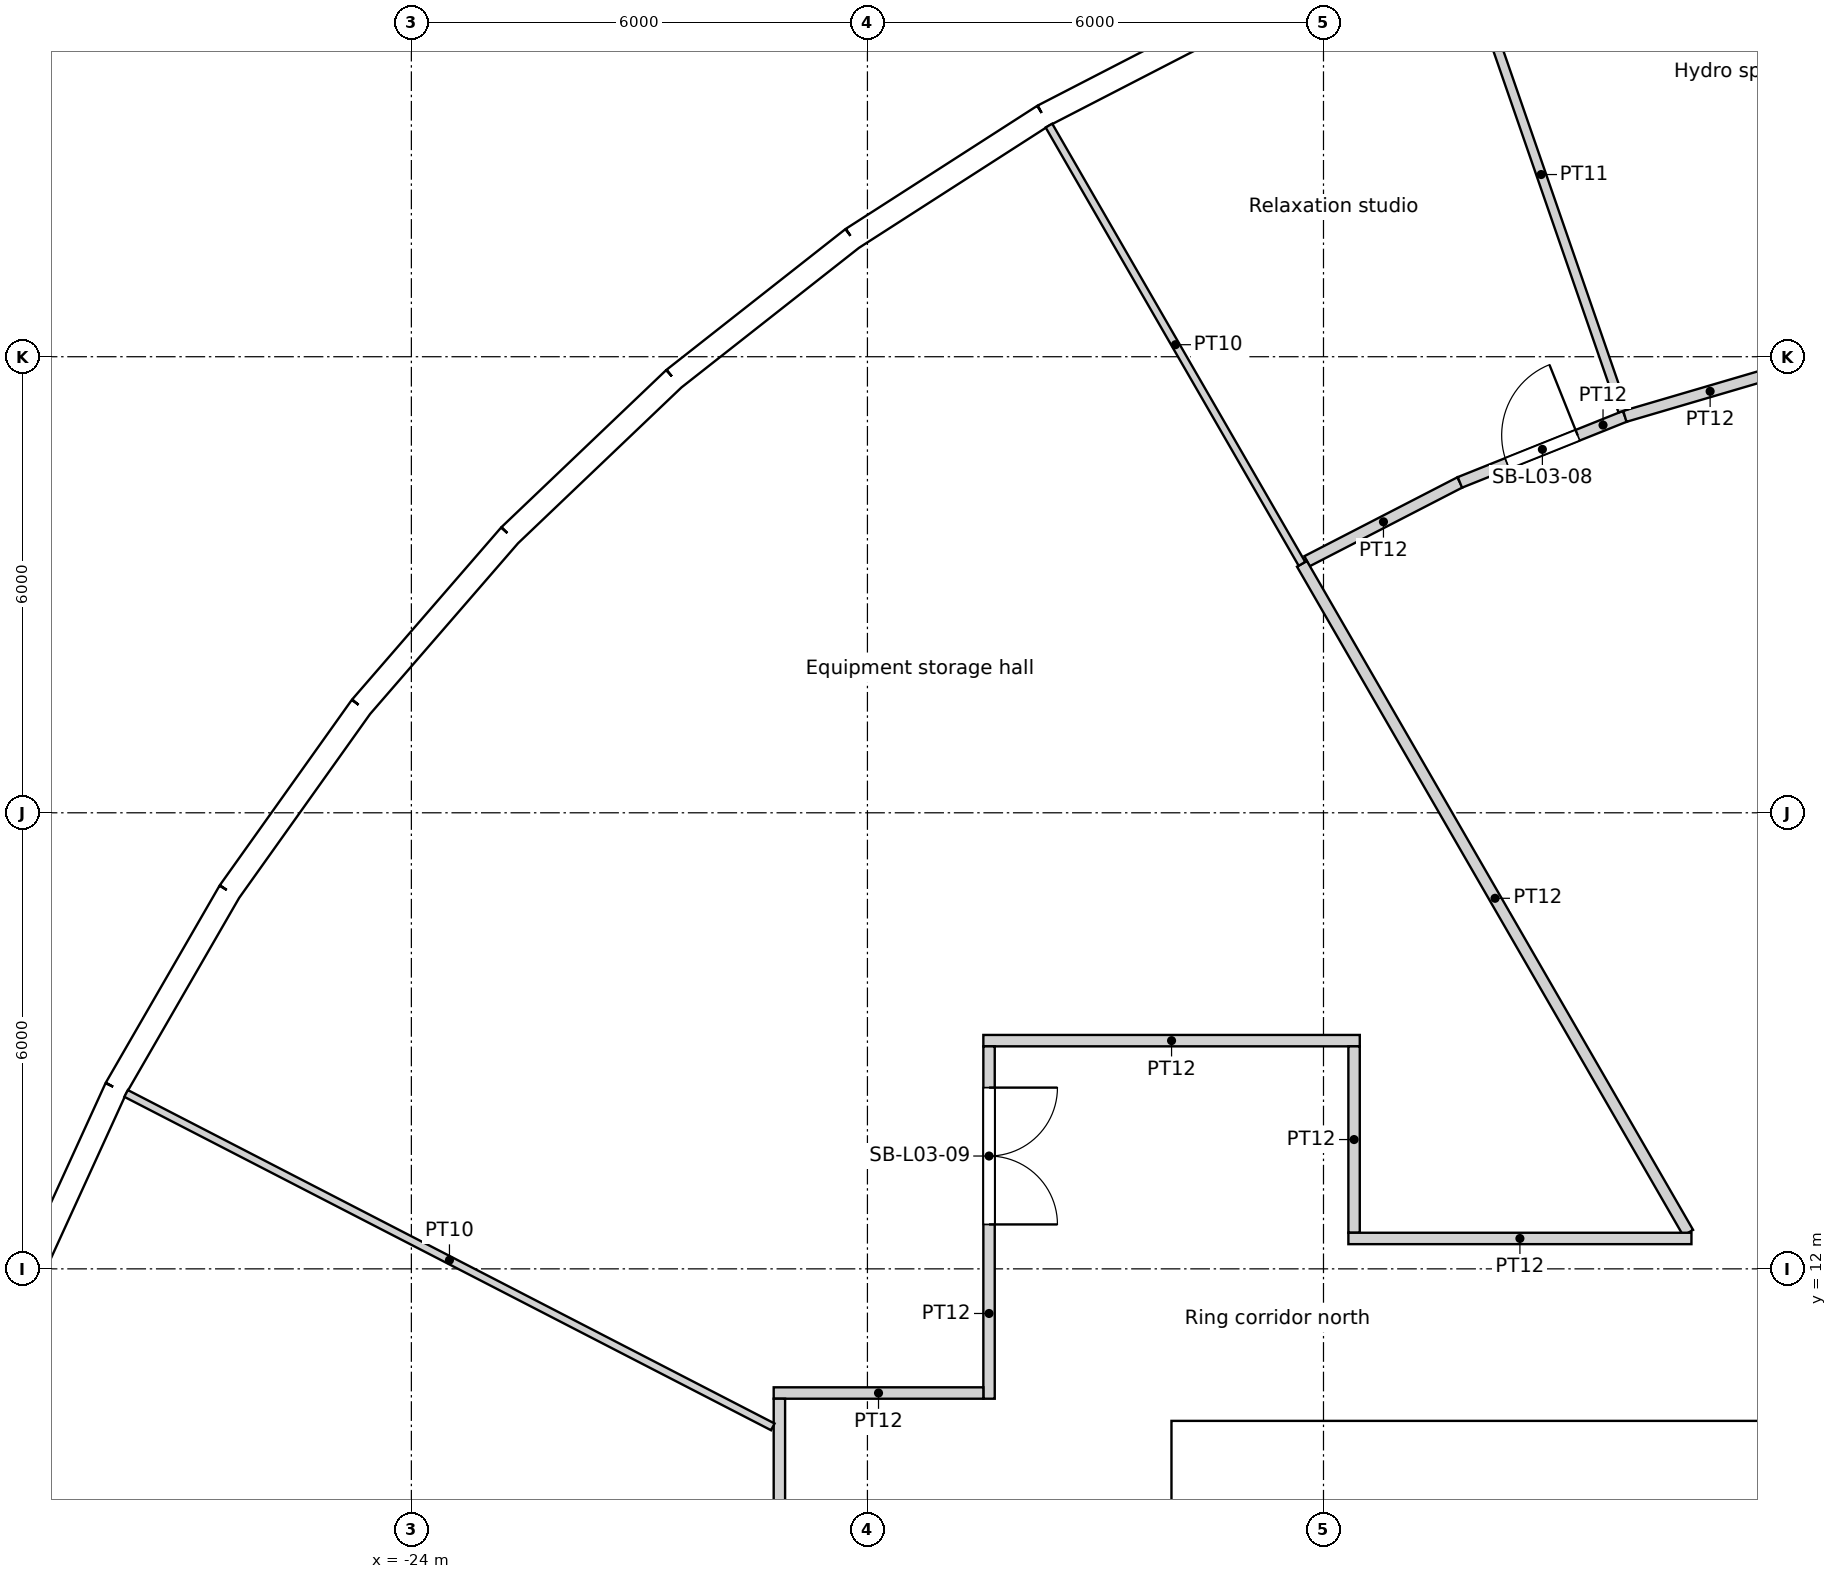
"""IFC4 building model, lengths in metres.
Left out: names, types, materials, properties, quantities, classifications, styles, units other than length and angle.
Written with IfcOpenShell. Run it as: python <this file> out.ifc"""

import sys

from ifc_helpers import new_model, si_unit, direction, frame, frame_2d, origin, origin_2d, place, context, subcontext, project, spatial, rectangle, circle, extrude, element, fill, save


model = new_model("IFC4")
c1 = context("Model", 3, precision=1e-05, world=origin(), true_north=direction((0.0, 1.0)))
c2 = subcontext(c1, "Body", "Model", "MODEL_VIEW")
j1 = project(units=[si_unit("LENGTHUNIT", "METRE"), si_unit("PLANEANGLEUNIT", "RADIAN")], contexts=[c1])
p1 = place(None, origin())
s1 = spatial("IfcSite", under=j1, at=p1, CompositionType="ELEMENT")
p2 = place(p1, origin())
s2 = spatial("IfcBuilding", under=s1, at=p2, CompositionType="ELEMENT")
p3 = place(p2, frame((0.0, 0.0, 18.6)))
s3 = spatial("IfcBuildingStorey", under=s2, at=p3, CompositionType="ELEMENT", Elevation=18.6)
for number, where, z_axis, x_axis in (
    (1, (-9.902, 28.61, 0.0), (0.0, 0.0, 1.0), (1.0, 0.0, 0.0)),
    (2, (-15.137, 26.219, 0.0), (0.0, 0.0, 1.0), (1.0, 0.0, 0.0)),
    (3, (-19.826, 22.88, 0.0), (0.0, 0.0, 1.0), (1.0, 0.0, 0.0)),
    (4, (-23.797, 18.715, 0.0), (0.0, 0.0, 1.0), (1.0, 0.0, 0.0)),
    (5, (-26.909, 13.873, 0.0), (0.0, 0.0, 1.0), (1.0, 0.0, 0.0)),
    (6, (-29.048, 8.529, 0.0), (0.0, 0.0, 1.0), (1.0, 0.0, 0.0)),
):
    element("IfcColumn", number, at=place(p3, frame(where, z_axis=z_axis, x_axis=x_axis)), inside=s3, PredefinedType="COLUMN", context=c2, shape_type="SweptSolid", body=[
        extrude(circle(Radius=0.7, at=origin_2d()), origin(), (0.0, 0.0, 1.0), 4.8),
    ])
for number, where, z_axis, x_axis in (
    (7, (-7.04, 23.516, 0.0), (0.0, 0.0, 1.0), (1.0, 0.0, 0.0)),
    (8, (-12.274, 21.259, 0.0), (0.0, 0.0, 1.0), (1.0, 0.0, 0.0)),
    (9, (-16.846, 17.855, 0.0), (0.0, 0.0, 1.0), (1.0, 0.0, 0.0)),
    (10, (-20.509, 13.489, 0.0), (0.0, 0.0, 1.0), (1.0, 0.0, 0.0)),
    (11, (-23.067, 8.396, 0.0), (0.0, 0.0, 1.0), (1.0, 0.0, 0.0)),
):
    element("IfcColumn", number, at=place(p3, frame(where, z_axis=z_axis, x_axis=x_axis)), inside=s3, PredefinedType="COLUMN", context=c2, shape_type="SweptSolid", body=[
        extrude(circle(Radius=0.75, at=origin_2d()), origin(), (0.0, 0.0, 1.0), 4.8),
    ])
for number, where, z_axis, x_axis in (
    (12, (-9.411, 16.301, 0.0), (0.0, 0.0, 1.0), (1.0, 0.0, 0.0)),
    (13, (-13.798, 12.802, 0.0), (0.0, 0.0, 1.0), (1.0, 0.0, 0.0)),
):
    element("IfcColumn", number, at=place(p3, frame(where, z_axis=z_axis, x_axis=x_axis)), inside=s3, PredefinedType="COLUMN", context=c2, shape_type="SweptSolid", body=[
        extrude(circle(Radius=0.8, at=origin_2d()), origin(), (0.0, 0.0, 1.0), 4.8),
    ])
p4 = place(p3, frame((-13.033, 28.539, 0.0), z_axis=(0.0, 0.0, 1.0), x_axis=(-0.888831268481, -0.458234630043, 0.0)))
e14 = element("IfcWall", 14, at=p4, inside=s3, PredefinedType="SOLIDWALL", context=c2, shape_type="SweptSolid", body=[
    extrude(rectangle(XDim=2.986, YDim=0.3, at=frame_2d((1.493, 0.0))), origin(), (0.0, 0.0, 1.0), 4.35),
])
p5 = place(p4, frame((1.493, 0.0, 2.0)))
e15 = element("IfcOpeningElement", 15, at=p5, cuts=e14, PredefinedType="OPENING", context=c2, shape_type="SweptSolid", body=[
    extrude(circle(Radius=1.2, at=origin_2d()), frame((0.0, 0.16, 0.0), z_axis=(0.0, -1.0, 0.0), x_axis=(1.0, 0.0, 0.0)), (0.0, 0.0, 1.0), 0.32),
])
p6 = place(p3, frame((-15.687, 27.171, 0.0), z_axis=(0.0, 0.0, 1.0), x_axis=(-0.841242231846, -0.540658401727, 0.0)))
e16 = element("IfcWall", 16, at=p6, inside=s3, PredefinedType="SOLIDWALL", context=c2, shape_type="SweptSolid", body=[
    extrude(rectangle(XDim=2.986, YDim=0.3, at=frame_2d((1.493, 0.0))), origin(), (0.0, 0.0, 1.0), 4.35),
])
p7 = place(p6, frame((1.493, 0.0, 2.0)))
e17 = element("IfcOpeningElement", 17, at=p7, cuts=e16, PredefinedType="OPENING", context=c2, shape_type="SweptSolid", body=[
    extrude(circle(Radius=1.2, at=origin_2d()), frame((0.0, 0.16, 0.0), z_axis=(0.0, -1.0, 0.0), x_axis=(1.0, 0.0, 0.0)), (0.0, 0.0, 1.0), 0.32),
])
p8 = place(p3, frame((-18.199, 25.557, 0.0), z_axis=(0.0, 0.0, 1.0), x_axis=(-0.786043032847, -0.618171780747, 0.0)))
e18 = element("IfcWall", 18, at=p8, inside=s3, PredefinedType="SOLIDWALL", context=c2, shape_type="SweptSolid", body=[
    extrude(rectangle(XDim=2.986, YDim=0.3, at=frame_2d((1.493, 0.0))), origin(), (0.0, 0.0, 1.0), 4.35),
])
p9 = place(p8, frame((1.493, 0.0, 2.0)))
e19 = element("IfcOpeningElement", 19, at=p9, cuts=e18, PredefinedType="OPENING", context=c2, shape_type="SweptSolid", body=[
    extrude(circle(Radius=1.2, at=origin_2d()), frame((0.0, 0.16, 0.0), z_axis=(0.0, -1.0, 0.0), x_axis=(1.0, 0.0, 0.0)), (0.0, 0.0, 1.0), 0.32),
])
p10 = place(p3, frame((-20.546, 23.711, 0.0), z_axis=(0.0, 0.0, 1.0), x_axis=(-0.723750841228, -0.690061388444, 0.0)))
e20 = element("IfcWall", 20, at=p10, inside=s3, PredefinedType="SOLIDWALL", context=c2, shape_type="SweptSolid", body=[
    extrude(rectangle(XDim=2.986, YDim=0.3, at=frame_2d((1.493, 0.0))), origin(), (0.0, 0.0, 1.0), 4.35),
])
p11 = place(p10, frame((1.493, 0.0, 2.0)))
e21 = element("IfcOpeningElement", 21, at=p11, cuts=e20, PredefinedType="OPENING", context=c2, shape_type="SweptSolid", body=[
    extrude(circle(Radius=1.2, at=origin_2d()), frame((0.0, 0.16, 0.0), z_axis=(0.0, -1.0, 0.0), x_axis=(1.0, 0.0, 0.0)), (0.0, 0.0, 1.0), 0.32),
])
p12 = place(p3, frame((-22.707, 21.651, 0.0), z_axis=(0.0, 0.0, 1.0), x_axis=(-0.654809121128, -0.755794294029, 0.0)))
e22 = element("IfcWall", 22, at=p12, inside=s3, PredefinedType="SOLIDWALL", context=c2, shape_type="SweptSolid", body=[
    extrude(rectangle(XDim=2.986, YDim=0.3, at=frame_2d((1.493, 0.0))), origin(), (0.0, 0.0, 1.0), 4.35),
])
p13 = place(p12, frame((1.493, 0.0, 2.0)))
e23 = element("IfcOpeningElement", 23, at=p13, cuts=e22, PredefinedType="OPENING", context=c2, shape_type="SweptSolid", body=[
    extrude(circle(Radius=1.2, at=origin_2d()), frame((0.0, 0.16, 0.0), z_axis=(0.0, -1.0, 0.0), x_axis=(1.0, 0.0, 0.0)), (0.0, 0.0, 1.0), 0.32),
])
p14 = place(p3, frame((-24.662, 19.394, 0.0), z_axis=(0.0, 0.0, 1.0), x_axis=(-0.580100533892, -0.814544885551, 0.0)))
e24 = element("IfcWall", 24, at=p14, inside=s3, PredefinedType="SOLIDWALL", context=c2, shape_type="SweptSolid", body=[
    extrude(rectangle(XDim=2.986, YDim=0.3, at=frame_2d((1.493, 0.0))), origin(), (0.0, 0.0, 1.0), 4.35),
])
p15 = place(p14, frame((1.493, 0.0, 2.0)))
e25 = element("IfcOpeningElement", 25, at=p15, cuts=e24, PredefinedType="OPENING", context=c2, shape_type="SweptSolid", body=[
    extrude(circle(Radius=1.2, at=origin_2d()), frame((0.0, 0.16, 0.0), z_axis=(0.0, -1.0, 0.0), x_axis=(1.0, 0.0, 0.0)), (0.0, 0.0, 1.0), 0.32),
])
p16 = place(p3, frame((-26.394, 16.962, 0.0), z_axis=(0.0, 0.0, 1.0), x_axis=(-0.500017373705, -0.866015372839, 0.0)))
e26 = element("IfcWall", 26, at=p16, inside=s3, PredefinedType="SOLIDWALL", context=c2, shape_type="SweptSolid", body=[
    extrude(rectangle(XDim=2.986, YDim=0.3, at=frame_2d((1.493, 0.0))), origin(), (0.0, 0.0, 1.0), 4.35),
])
p17 = place(p16, frame((1.493, 0.0, 2.0)))
e27 = element("IfcOpeningElement", 27, at=p17, cuts=e26, PredefinedType="OPENING", context=c2, shape_type="SweptSolid", body=[
    extrude(circle(Radius=1.2, at=origin_2d()), frame((0.0, 0.16, 0.0), z_axis=(0.0, -1.0, 0.0), x_axis=(1.0, 0.0, 0.0)), (0.0, 0.0, 1.0), 0.32),
])
p18 = place(p3, frame((-27.887, 14.377, 0.0), z_axis=(0.0, 0.0, 1.0), x_axis=(-0.415373250944, -0.909651066289, 0.0)))
e28 = element("IfcWall", 28, at=p18, inside=s3, PredefinedType="SOLIDWALL", context=c2, shape_type="SweptSolid", body=[
    extrude(rectangle(XDim=2.986, YDim=0.3, at=frame_2d((1.493, 0.0))), origin(), (0.0, 0.0, 1.0), 4.35),
])
p19 = place(p18, frame((1.493, 0.0, 2.0)))
e29 = element("IfcOpeningElement", 29, at=p19, cuts=e28, PredefinedType="OPENING", context=c2, shape_type="SweptSolid", body=[
    extrude(circle(Radius=1.2, at=origin_2d()), frame((0.0, 0.16, 0.0), z_axis=(0.0, -1.0, 0.0), x_axis=(1.0, 0.0, 0.0)), (0.0, 0.0, 1.0), 0.32),
])
p20 = place(p3, frame((-14.0, 9.4, 0.0), z_axis=(0.0, 0.0, 1.0), x_axis=(1.0, 0.0, 0.0)))
e30 = element("IfcWall", 30, at=p20, inside=s3, PredefinedType="SOLIDWALL", context=c2, shape_type="SweptSolid", body=[
    extrude(rectangle(XDim=28.0, YDim=1.2, at=frame_2d((14.0, 0.0))), origin(), (0.0, 0.0, 1.0), 4.8),
])
p21 = place(p20, frame((9.8, 0.0, 0.0)))
e31 = element("IfcOpeningElement", 31, at=p21, cuts=e30, PredefinedType="OPENING", context=c2, shape_type="SweptSolid", body=[
    extrude(rectangle(XDim=1.8, YDim=2.1, at=frame_2d((0.9, 1.05))), frame((0.0, 0.6, 0.0), z_axis=(0.0, -1.0, 0.0), x_axis=(1.0, 0.0, 0.0)), (0.0, 0.0, 1.0), 1.2),
])
p22 = place(p3, frame((-27.753, 14.308, 0.0), z_axis=(0.0, 0.0, 1.0), x_axis=(0.888834817613, -0.458227745776, 0.0)))
e32 = element("IfcWall", 32, at=p22, inside=s3, PredefinedType="PARTITIONING", context=c2, shape_type="SweptSolid", body=[
    extrude(rectangle(XDim=9.573, YDim=0.1, at=frame_2d((4.786, 0.0))), origin(), (0.0, 0.0, 1.0), 3.75),
])
p23 = place(p3, frame((-19.158, 10.292, 0.0), z_axis=(0.0, 0.0, 1.0), x_axis=(0.0, -1.0, 0.0)))
e33 = element("IfcWall", 33, at=p23, inside=s3, PredefinedType="PARTITIONING", context=c2, shape_type="SweptSolid", body=[
    extrude(rectangle(XDim=4.4, YDim=0.15, at=frame_2d((2.2, 0.0))), origin(), (0.0, 0.0, 1.0), 3.75),
])
p24 = place(p3, frame((-16.475, 10.367, 0.0), z_axis=(0.0, 0.0, 1.0), x_axis=(-1.0, 0.0, 0.0)))
e34 = element("IfcWall", 34, at=p24, inside=s3, PredefinedType="PARTITIONING", context=c2, shape_type="SweptSolid", body=[
    extrude(rectangle(XDim=2.758, YDim=0.15, at=frame_2d((1.379, 0.0))), origin(), (0.0, 0.0, 1.0), 3.75),
])
p25 = place(p3, frame((-16.4, 10.292, 0.0), z_axis=(0.0, 0.0, 1.0), x_axis=(0.0, 1.0, 0.0)))
e35 = element("IfcWall", 35, at=p25, inside=s3, PredefinedType="PARTITIONING", context=c2, shape_type="SweptSolid", body=[
    extrude(rectangle(XDim=4.636, YDim=0.15, at=frame_2d((2.318, 0.0))), origin(), (0.0, 0.0, 1.0), 3.75),
])
p26 = place(p25, frame((2.293, 0.0, 0.0)))
e36 = element("IfcOpeningElement", 36, at=p26, cuts=e35, PredefinedType="OPENING", context=c2, shape_type="SweptSolid", body=[
    extrude(rectangle(XDim=1.8, YDim=2.4, at=frame_2d((0.9, 1.2))), frame((0.0, 0.075, 0.0), z_axis=(0.0, -1.0, 0.0), x_axis=(1.0, 0.0, 0.0)), (0.0, 0.0, 1.0), 0.15),
])
p27 = place(p3, frame((-15.612, 27.041, 0.0), z_axis=(0.0, 0.0, 1.0), x_axis=(0.499980638446, -0.866036581894, 0.0)))
e37 = element("IfcWall", 37, at=p27, inside=s3, PredefinedType="PARTITIONING", context=c2, shape_type="SweptSolid", body=[
    extrude(rectangle(XDim=6.657, YDim=0.1, at=frame_2d((3.329, 0.0))), origin(), (0.0, 0.0, 1.0), 3.75),
])
p28 = place(p3, frame((-12.283, 21.275, 0.0), z_axis=(0.0, 0.0, 1.0), x_axis=(0.500014995272, -0.866016746087, 0.0)))
e38 = element("IfcWall", 38, at=p28, inside=s3, PredefinedType="PARTITIONING", context=c2, shape_type="SweptSolid", body=[
    extrude(rectangle(XDim=10.162, YDim=0.15, at=frame_2d((5.081, 0.0))), origin(), (0.0, 0.0, 1.0), 3.75),
])
p29 = place(p3, frame((-11.598, 12.475, 0.0), z_axis=(0.0, 0.0, 1.0), x_axis=(0.0, 1.0, 0.0)))
e39 = element("IfcWall", 39, at=p29, inside=s3, PredefinedType="PARTITIONING", context=c2, shape_type="SweptSolid", body=[
    extrude(rectangle(XDim=2.452, YDim=0.15, at=frame_2d((1.226, 0.0))), origin(), (0.0, 0.0, 1.0), 3.75),
])
p30 = place(p3, frame((-11.523, 15.002, 0.0), z_axis=(0.0, 0.0, 1.0), x_axis=(-1.0, 0.0, 0.0)))
e40 = element("IfcWall", 40, at=p30, inside=s3, PredefinedType="PARTITIONING", context=c2, shape_type="SweptSolid", body=[
    extrude(rectangle(XDim=4.952, YDim=0.15, at=frame_2d((2.476, 0.0))), origin(), (0.0, 0.0, 1.0), 3.75),
])
p31 = place(p3, frame((-10.212, 29.507, 0.0), z_axis=(0.0, 0.0, 1.0), x_axis=(0.327055786406, -0.945005033097, 0.0)))
e41 = element("IfcWall", 41, at=p31, inside=s3, PredefinedType="PARTITIONING", context=c2, shape_type="SweptSolid", body=[
    extrude(rectangle(XDim=6.583, YDim=0.125, at=frame_2d((3.291, 0.0))), origin(), (0.0, 0.0, 1.0), 3.75),
])
p32 = place(p3, frame((-10.205, 22.347, 0.0), z_axis=(0.0, 0.0, 1.0), x_axis=(-0.888857404952, -0.458183929947, 0.0)))
e42 = element("IfcWall", 42, at=p32, inside=s3, PredefinedType="PARTITIONING", context=c2, shape_type="SweptSolid", body=[
    extrude(rectangle(XDim=2.263, YDim=0.15, at=frame_2d((1.131, 0.0))), origin(), (0.0, 0.0, 1.0), 3.75),
])
p33 = place(p3, frame((-10.205, 22.347, 0.0), z_axis=(0.0, 0.0, 1.0), x_axis=(0.92836862221, 0.371660734133, 0.0)))
e43 = element("IfcWall", 43, at=p33, inside=s3, PredefinedType="PARTITIONING", context=c2, shape_type="SweptSolid", body=[
    extrude(rectangle(XDim=2.338, YDim=0.15, at=frame_2d((1.169, 0.0))), origin(), (0.0, 0.0, 1.0), 3.75),
])
p34 = place(p33, frame((0.669, 0.0, 0.0)))
e44 = element("IfcOpeningElement", 44, at=p34, cuts=e43, PredefinedType="OPENING", context=c2, shape_type="SweptSolid", body=[
    extrude(rectangle(XDim=1.0, YDim=2.1, at=frame_2d((0.5, 1.05))), frame((0.0, 0.075, 0.0), z_axis=(0.0, -1.0, 0.0), x_axis=(1.0, 0.0, 0.0)), (0.0, 0.0, 1.0), 0.15),
])
p35 = place(p3, frame((-7.159, 12.4, 0.0), z_axis=(0.0, 0.0, 1.0), x_axis=(-1.0, 0.0, 0.0)))
e45 = element("IfcWall", 45, at=p35, inside=s3, PredefinedType="PARTITIONING", context=c2, shape_type="SweptSolid", body=[
    extrude(rectangle(XDim=4.513, YDim=0.15, at=frame_2d((2.257, 0.0))), origin(), (0.0, 0.0, 1.0), 3.75),
])
p36 = place(p3, frame((-5.792, 23.874, 0.0), z_axis=(0.0, 0.0, 1.0), x_axis=(-0.959488462959, -0.28174791827, 0.0)))
e46 = element("IfcWall", 46, at=p36, inside=s3, PredefinedType="PARTITIONING", context=c2, shape_type="SweptSolid", body=[
    extrude(rectangle(XDim=2.338, YDim=0.15, at=frame_2d((1.169, 0.0))), origin(), (0.0, 0.0, 1.0), 3.75),
])
p37 = place(p5, origin())
e47 = element("IfcWindow", 47, at=p37, inside=s3, PartitioningType="SINGLE_PANEL", PredefinedType="WINDOW", context=c2, shape_type="SweptSolid", body=[
    extrude(circle(Radius=1.2, at=origin_2d()), frame((0.0, 0.12, 0.0), z_axis=(0.0, -1.0, 0.0), x_axis=(1.0, 0.0, 0.0)), (0.0, 0.0, 1.0), 0.1),
])
fill(e15, e47)
p38 = place(p7, origin())
e48 = element("IfcWindow", 48, at=p38, inside=s3, PartitioningType="SINGLE_PANEL", PredefinedType="WINDOW", context=c2, shape_type="SweptSolid", body=[
    extrude(circle(Radius=1.2, at=origin_2d()), frame((0.0, 0.12, 0.0), z_axis=(0.0, -1.0, 0.0), x_axis=(1.0, 0.0, 0.0)), (0.0, 0.0, 1.0), 0.1),
])
fill(e17, e48)
p39 = place(p9, origin())
e49 = element("IfcWindow", 49, at=p39, inside=s3, PartitioningType="SINGLE_PANEL", PredefinedType="WINDOW", context=c2, shape_type="SweptSolid", body=[
    extrude(circle(Radius=1.2, at=origin_2d()), frame((0.0, 0.12, 0.0), z_axis=(0.0, -1.0, 0.0), x_axis=(1.0, 0.0, 0.0)), (0.0, 0.0, 1.0), 0.1),
])
fill(e19, e49)
p40 = place(p11, origin())
e50 = element("IfcWindow", 50, at=p40, inside=s3, PartitioningType="SINGLE_PANEL", PredefinedType="WINDOW", context=c2, shape_type="SweptSolid", body=[
    extrude(circle(Radius=1.2, at=origin_2d()), frame((0.0, 0.12, 0.0), z_axis=(0.0, -1.0, 0.0), x_axis=(1.0, 0.0, 0.0)), (0.0, 0.0, 1.0), 0.1),
])
fill(e21, e50)
p41 = place(p13, origin())
e51 = element("IfcWindow", 51, at=p41, inside=s3, PartitioningType="SINGLE_PANEL", PredefinedType="WINDOW", context=c2, shape_type="SweptSolid", body=[
    extrude(circle(Radius=1.2, at=origin_2d()), frame((0.0, 0.12, 0.0), z_axis=(0.0, -1.0, 0.0), x_axis=(1.0, 0.0, 0.0)), (0.0, 0.0, 1.0), 0.1),
])
fill(e23, e51)
p42 = place(p15, origin())
e52 = element("IfcWindow", 52, at=p42, inside=s3, PartitioningType="SINGLE_PANEL", PredefinedType="WINDOW", context=c2, shape_type="SweptSolid", body=[
    extrude(circle(Radius=1.2, at=origin_2d()), frame((0.0, 0.12, 0.0), z_axis=(0.0, -1.0, 0.0), x_axis=(1.0, 0.0, 0.0)), (0.0, 0.0, 1.0), 0.1),
])
fill(e25, e52)
p43 = place(p17, origin())
e53 = element("IfcWindow", 53, at=p43, inside=s3, PartitioningType="SINGLE_PANEL", PredefinedType="WINDOW", context=c2, shape_type="SweptSolid", body=[
    extrude(circle(Radius=1.2, at=origin_2d()), frame((0.0, 0.12, 0.0), z_axis=(0.0, -1.0, 0.0), x_axis=(1.0, 0.0, 0.0)), (0.0, 0.0, 1.0), 0.1),
])
fill(e27, e53)
p44 = place(p19, origin())
e54 = element("IfcWindow", 54, at=p44, inside=s3, PartitioningType="SINGLE_PANEL", PredefinedType="WINDOW", context=c2, shape_type="SweptSolid", body=[
    extrude(circle(Radius=1.2, at=origin_2d()), frame((0.0, 0.12, 0.0), z_axis=(0.0, -1.0, 0.0), x_axis=(1.0, 0.0, 0.0)), (0.0, 0.0, 1.0), 0.1),
])
fill(e29, e54)
p45 = place(p34, origin())
e55 = element("IfcDoor", 55, at=p45, inside=s3, OperationType="SINGLE_SWING_RIGHT", PredefinedType="DOOR", context=c2, shape_type="SweptSolid", body=[
    extrude(rectangle(XDim=1.0, YDim=2.1, at=frame_2d((0.5, 1.05))), frame((0.0, 0.025, 0.0), z_axis=(0.0, -1.0, 0.0), x_axis=(1.0, 0.0, 0.0)), (0.0, 0.0, 1.0), 0.05),
])
fill(e44, e55)
p46 = place(p26, origin())
e56 = element("IfcDoor", 56, at=p46, inside=s3, OperationType="DOUBLE_DOOR_SINGLE_SWING", PredefinedType="DOOR", context=c2, shape_type="SweptSolid", body=[
    extrude(rectangle(XDim=1.8, YDim=2.4, at=frame_2d((0.9, 1.2))), frame((0.0, 0.025, 0.0), z_axis=(0.0, -1.0, 0.0), x_axis=(1.0, 0.0, 0.0)), (0.0, 0.0, 1.0), 0.05),
])
fill(e36, e56)
save(model, sys.argv[1])
